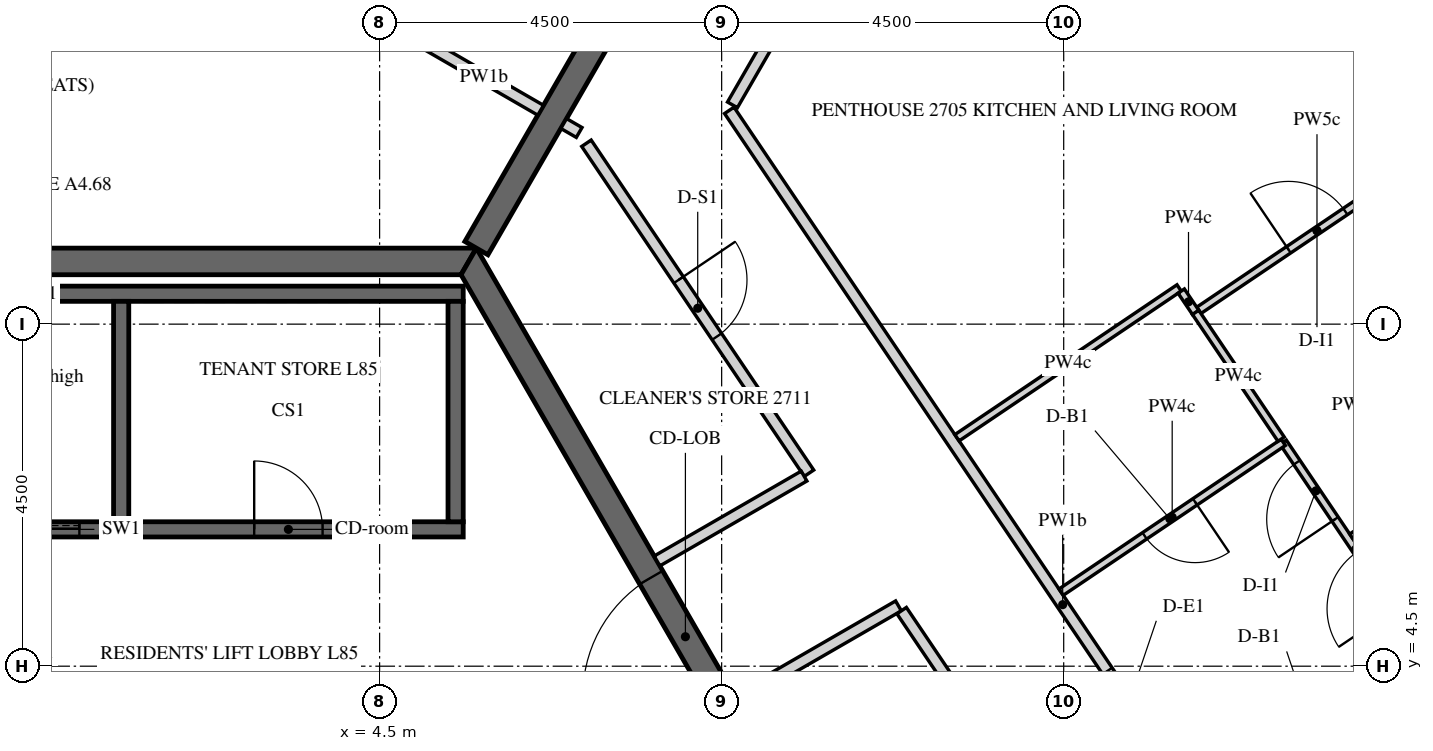
"""IFC4 building model, lengths in metres.
Left out: names, types, materials, properties, quantities, classifications, styles, units other than length and angle.
Written with IfcOpenShell. Run it as: python <this file> out.ifc"""

import sys

from ifc_helpers import new_model, si_unit, direction, frame, frame_2d, origin, place, context, subcontext, project, spatial, polyline, rectangle, outline, extrude, element, fill, save


model = new_model("IFC4")
c1 = context("Model", 3, precision=1e-05, world=origin(), true_north=direction((0.0, 1.0)))
c2 = subcontext(c1, "Body", "Model", "MODEL_VIEW")
j1 = project(units=[si_unit("LENGTHUNIT", "METRE"), si_unit("PLANEANGLEUNIT", "RADIAN")], contexts=[c1])
p1 = place(None, origin())
s1 = spatial("IfcSite", under=j1, at=p1, CompositionType="ELEMENT")
p2 = place(p1, origin())
s2 = spatial("IfcBuilding", under=s1, at=p2, CompositionType="ELEMENT")
p3 = place(p2, frame((0.0, 0.0, 353.4)))
s3 = spatial("IfcBuildingStorey", under=s2, at=p3, CompositionType="ELEMENT", Elevation=353.4)
p4 = place(p3, frame((24.37, 2.811, -0.15), z_axis=(0.0, 0.0, 1.0), x_axis=(-0.559187034749, 0.829041531027, 0.0)))
e1 = element("IfcWall", 1, at=p4, inside=s3, PredefinedType="SOLIDWALL", context=c2, shape_type="SweptSolid", body=[
    extrude(outline(polyline([(0.225, -0.225), (20.506, -0.225), (20.957, 0.225), (-0.225, 0.225), (0.225, -0.225)])), origin(), (0.0, 0.0, 1.0), 3.9),
])
p5 = place(p4, frame((0.325, 0.0, 1.05)))
e2 = element("IfcOpeningElement", 2, at=p5, cuts=e1, PredefinedType="OPENING", context=c2, shape_type="SweptSolid", body=[
    extrude(rectangle(XDim=0.9, YDim=1.5, at=frame_2d((0.45, 0.75))), frame((0.0, 0.235, 0.0), z_axis=(0.0, -1.0, 0.0), x_axis=(1.0, 0.0, 0.0)), (0.0, 0.0, 1.0), 0.47),
])
p6 = place(p4, frame((1.525, 0.0, 0.15)))
e3 = element("IfcOpeningElement", 3, at=p6, cuts=e1, PredefinedType="OPENING", context=c2, shape_type="SweptSolid", body=[
    extrude(rectangle(XDim=1.2, YDim=2.4, at=frame_2d((0.6, 1.2))), frame((0.0, 0.235, 0.0), z_axis=(0.0, -1.0, 0.0), x_axis=(1.0, 0.0, 0.0)), (0.0, 0.0, 1.0), 0.47),
])
p7 = place(p4, frame((3.766, 0.0, 1.05)))
e4 = element("IfcOpeningElement", 4, at=p7, cuts=e1, PredefinedType="OPENING", context=c2, shape_type="SweptSolid", body=[
    extrude(rectangle(XDim=0.9, YDim=1.5, at=frame_2d((0.45, 0.75))), frame((0.0, 0.235, 0.0), z_axis=(0.0, -1.0, 0.0), x_axis=(1.0, 0.0, 0.0)), (0.0, 0.0, 1.0), 0.47),
])
p8 = place(p4, frame((4.966, 0.0, 0.15)))
e5 = element("IfcOpeningElement", 5, at=p8, cuts=e1, PredefinedType="OPENING", context=c2, shape_type="SweptSolid", body=[
    extrude(rectangle(XDim=1.2, YDim=2.4, at=frame_2d((0.6, 1.2))), frame((0.0, 0.235, 0.0), z_axis=(0.0, -1.0, 0.0), x_axis=(1.0, 0.0, 0.0)), (0.0, 0.0, 1.0), 0.47),
])
p9 = place(p4, frame((7.366, 0.0, 1.05)))
e6 = element("IfcOpeningElement", 6, at=p9, cuts=e1, PredefinedType="OPENING", context=c2, shape_type="SweptSolid", body=[
    extrude(rectangle(XDim=0.9, YDim=1.5, at=frame_2d((0.45, 0.75))), frame((0.0, 0.235, 0.0), z_axis=(0.0, -1.0, 0.0), x_axis=(1.0, 0.0, 0.0)), (0.0, 0.0, 1.0), 0.47),
])
p10 = place(p4, frame((8.566, 0.0, 0.15)))
e7 = element("IfcOpeningElement", 7, at=p10, cuts=e1, PredefinedType="OPENING", context=c2, shape_type="SweptSolid", body=[
    extrude(rectangle(XDim=1.2, YDim=2.4, at=frame_2d((0.6, 1.2))), frame((0.0, 0.235, 0.0), z_axis=(0.0, -1.0, 0.0), x_axis=(1.0, 0.0, 0.0)), (0.0, 0.0, 1.0), 0.47),
])
p11 = place(p4, frame((10.966, 0.0, 1.05)))
e8 = element("IfcOpeningElement", 8, at=p11, cuts=e1, PredefinedType="OPENING", context=c2, shape_type="SweptSolid", body=[
    extrude(rectangle(XDim=0.9, YDim=1.5, at=frame_2d((0.45, 0.75))), frame((0.0, 0.235, 0.0), z_axis=(0.0, -1.0, 0.0), x_axis=(1.0, 0.0, 0.0)), (0.0, 0.0, 1.0), 0.47),
])
p12 = place(p4, frame((12.166, 0.0, 0.15)))
e9 = element("IfcOpeningElement", 9, at=p12, cuts=e1, PredefinedType="OPENING", context=c2, shape_type="SweptSolid", body=[
    extrude(rectangle(XDim=1.2, YDim=2.4, at=frame_2d((0.6, 1.2))), frame((0.0, 0.235, 0.0), z_axis=(0.0, -1.0, 0.0), x_axis=(1.0, 0.0, 0.0)), (0.0, 0.0, 1.0), 0.47),
])
p13 = place(p4, frame((14.566, 0.0, 1.05)))
e10 = element("IfcOpeningElement", 10, at=p13, cuts=e1, PredefinedType="OPENING", context=c2, shape_type="SweptSolid", body=[
    extrude(rectangle(XDim=0.9, YDim=1.5, at=frame_2d((0.45, 0.75))), frame((0.0, 0.235, 0.0), z_axis=(0.0, -1.0, 0.0), x_axis=(1.0, 0.0, 0.0)), (0.0, 0.0, 1.0), 0.47),
])
p14 = place(p4, frame((15.766, 0.0, 0.15)))
e11 = element("IfcOpeningElement", 11, at=p14, cuts=e1, PredefinedType="OPENING", context=c2, shape_type="SweptSolid", body=[
    extrude(rectangle(XDim=1.2, YDim=2.4, at=frame_2d((0.6, 1.2))), frame((0.0, 0.235, 0.0), z_axis=(0.0, -1.0, 0.0), x_axis=(1.0, 0.0, 0.0)), (0.0, 0.0, 1.0), 0.47),
])
p15 = place(p4, frame((18.007, 0.0, 1.05)))
e12 = element("IfcOpeningElement", 12, at=p15, cuts=e1, PredefinedType="OPENING", context=c2, shape_type="SweptSolid", body=[
    extrude(rectangle(XDim=0.9, YDim=1.5, at=frame_2d((0.45, 0.75))), frame((0.0, 0.235, 0.0), z_axis=(0.0, -1.0, 0.0), x_axis=(1.0, 0.0, 0.0)), (0.0, 0.0, 1.0), 0.47),
])
p16 = place(p4, frame((19.207, 0.0, 0.15)))
e13 = element("IfcOpeningElement", 13, at=p16, cuts=e1, PredefinedType="OPENING", context=c2, shape_type="SweptSolid", body=[
    extrude(rectangle(XDim=1.2, YDim=2.4, at=frame_2d((0.6, 1.2))), frame((0.0, 0.235, 0.0), z_axis=(0.0, -1.0, 0.0), x_axis=(1.0, 0.0, 0.0)), (0.0, 0.0, 1.0), 0.47),
])
p17 = place(p3, frame((11.345, 0.0, -0.15), z_axis=(0.0, 0.0, 1.0), x_axis=(-0.499995046907, 0.866028263435, 0.0)))
e14 = element("IfcWall", 14, at=p17, inside=s3, PredefinedType="SHEAR", context=c2, shape_type="SweptSolid", body=[
    extrude(outline(polyline([(-0.101, -0.175), (11.446, -0.175), (11.244, 0.175), (0.101, 0.175), (-0.101, -0.175)])), origin(), (0.0, 0.0, 1.0), 3.9),
])
p18 = place(p17, frame((4.744, 0.0, 0.15)))
e15 = element("IfcOpeningElement", 15, at=p18, cuts=e14, PredefinedType="OPENING", context=c2, shape_type="SweptSolid", body=[
    extrude(rectangle(XDim=1.8, YDim=2.4, at=frame_2d((0.9, 1.2))), frame((0.0, 0.185, 0.0), z_axis=(0.0, -1.0, 0.0), x_axis=(1.0, 0.0, 0.0)), (0.0, 0.0, 1.0), 0.37),
])
p19 = place(p3, frame((5.673, 9.825, -0.15), z_axis=(0.0, 0.0, 1.0), x_axis=(-1.0, 0.0, 0.0)))
e16 = element("IfcWall", 16, at=p19, inside=s3, PredefinedType="SHEAR", context=c2, shape_type="SweptSolid", body=[
    extrude(outline(polyline([(-0.101, -0.175), (11.446, -0.175), (11.244, 0.175), (0.101, 0.175), (-0.101, -0.175)])), origin(), (0.0, 0.0, 1.0), 3.9),
])
p20 = place(p3, frame((5.773, 10.0, -0.15), z_axis=(0.0, 0.0, 1.0), x_axis=(0.500007911273, 0.866020836161, 0.0)))
e17 = element("IfcWall", 17, at=p20, inside=s3, PredefinedType="SHEAR", context=c2, shape_type="SweptSolid", body=[
    extrude(rectangle(XDim=14.51, YDim=0.35, at=frame_2d((7.255, 0.0))), origin(), (0.0, 0.0, 1.0), 3.9),
])
p21 = place(p20, frame((6.355, 0.0, 0.15)))
e18 = element("IfcOpeningElement", 18, at=p21, cuts=e17, PredefinedType="OPENING", context=c2, shape_type="SweptSolid", body=[
    extrude(rectangle(XDim=1.8, YDim=2.4, at=frame_2d((0.9, 1.2))), frame((0.0, 0.185, 0.0), z_axis=(0.0, -1.0, 0.0), x_axis=(1.0, 0.0, 0.0)), (0.0, 0.0, 1.0), 0.37),
])
p22 = place(p3, frame((-5.6, 6.3, -0.25), z_axis=(0.0, 0.0, 1.0), x_axis=(1.0, 0.0, 0.0)))
e19 = element("IfcWall", 19, at=p22, inside=s3, PredefinedType="SHEAR", context=c2, shape_type="SweptSolid", body=[
    extrude(rectangle(XDim=11.2, YDim=0.2, at=frame_2d((5.6, 0.0))), origin(), (0.0, 0.0, 1.0), 3.9),
])
p23 = place(p22, frame((8.45, 0.0, 0.25)))
e20 = element("IfcOpeningElement", 20, at=p23, cuts=e19, PredefinedType="OPENING", context=c2, shape_type="SweptSolid", body=[
    extrude(rectangle(XDim=0.9, YDim=2.1, at=frame_2d((0.45, 1.05))), frame((0.0, 0.11, 0.0), z_axis=(0.0, -1.0, 0.0), x_axis=(1.0, 0.0, 0.0)), (0.0, 0.0, 1.0), 0.22),
])
p24 = place(p22, frame((0.65, 0.0, 0.25)))
e21 = element("IfcOpeningElement", 21, at=p24, cuts=e19, PredefinedType="OPENING", context=c2, shape_type="SweptSolid", body=[
    extrude(rectangle(XDim=1.1, YDim=2.1, at=frame_2d((0.55, 1.05))), frame((0.0, 0.11, 0.0), z_axis=(0.0, -1.0, 0.0), x_axis=(1.0, 0.0, 0.0)), (0.0, 0.0, 1.0), 0.22),
])
p25 = place(p22, frame((2.85, 0.0, 0.25)))
e22 = element("IfcOpeningElement", 22, at=p25, cuts=e19, PredefinedType="OPENING", context=c2, shape_type="SweptSolid", body=[
    extrude(rectangle(XDim=1.1, YDim=2.1, at=frame_2d((0.55, 1.05))), frame((0.0, 0.11, 0.0), z_axis=(0.0, -1.0, 0.0), x_axis=(1.0, 0.0, 0.0)), (0.0, 0.0, 1.0), 0.22),
])
p26 = place(p22, frame((5.05, 0.0, 0.25)))
e23 = element("IfcOpeningElement", 23, at=p26, cuts=e19, PredefinedType="OPENING", context=c2, shape_type="SweptSolid", body=[
    extrude(rectangle(XDim=1.1, YDim=2.1, at=frame_2d((0.55, 1.05))), frame((0.0, 0.11, 0.0), z_axis=(0.0, -1.0, 0.0), x_axis=(1.0, 0.0, 0.0)), (0.0, 0.0, 1.0), 0.22),
])
p27 = place(p3, frame((-5.6, 9.4, -0.25), z_axis=(0.0, 0.0, 1.0), x_axis=(1.0, 0.0, 0.0)))
e24 = element("IfcWall", 24, at=p27, inside=s3, PredefinedType="SHEAR", context=c2, shape_type="SweptSolid", body=[
    extrude(rectangle(XDim=11.2, YDim=0.2, at=frame_2d((5.6, 0.0))), origin(), (0.0, 0.0, 1.0), 3.9),
])
for number, where, z_axis, x_axis in (
    (25, (1.1, 6.4, -0.25), (0.0, 0.0, 1.0), (0.0, 1.0, 0.0)),
    (26, (5.5, 6.4, -0.25), (0.0, 0.0, 1.0), (0.0, 1.0, 0.0)),
):
    element("IfcWall", number, at=place(p3, frame(where, z_axis=z_axis, x_axis=x_axis)), inside=s3, PredefinedType="SHEAR", context=c2, shape_type="SweptSolid", body=[
        extrude(rectangle(XDim=2.9, YDim=0.2, at=frame_2d((1.45, 0.0))), origin(), (0.0, 0.0, 1.0), 3.9),
    ])
p28 = place(p3, frame((5.125, 12.677, 0.0), z_axis=(0.0, 0.0, 1.0), x_axis=(0.866013532718, -0.500020560727, 0.0)))
e27 = element("IfcWall", 27, at=p28, inside=s3, PredefinedType="PARTITIONING", context=c2, shape_type="SweptSolid", body=[
    extrude(rectangle(XDim=1.725, YDim=0.15, at=frame_2d((0.863, 0.0))), origin(), (0.0, 0.0, 1.0), 2.82),
])
p29 = place(p3, frame((17.873, -1.193, 0.0), z_axis=(0.0, 0.0, 1.0), x_axis=(-0.559195650252, 0.829035719821, 0.0)))
e28 = element("IfcWall", 28, at=p29, inside=s3, PredefinedType="PARTITIONING", context=c2, shape_type="SweptSolid", body=[
    extrude(rectangle(XDim=15.688, YDim=0.15, at=frame_2d((7.844, 0.0))), origin(), (0.0, 0.0, 1.0), 2.82),
])
p30 = place(p29, frame((5.792, 0.0, 0.0)))
e29 = element("IfcOpeningElement", 29, at=p30, cuts=e28, PredefinedType="OPENING", context=c2, shape_type="SweptSolid", body=[
    extrude(rectangle(XDim=1.0, YDim=2.1, at=frame_2d((0.5, 1.05))), frame((0.0, 0.085, 0.0), z_axis=(0.0, -1.0, 0.0), x_axis=(1.0, 0.0, 0.0)), (0.0, 0.0, 1.0), 0.17),
])
p31 = place(p3, frame((9.142, 11.885, 0.0), z_axis=(0.0, 0.0, 1.0), x_axis=(0.500004822225, 0.866022619654, 0.0)))
e30 = element("IfcWall", 30, at=p31, inside=s3, PredefinedType="PARTITIONING", context=c2, shape_type="SweptSolid", body=[
    extrude(rectangle(XDim=5.339, YDim=0.15, at=frame_2d((2.669, 0.0))), origin(), (0.0, 0.0, 1.0), 2.82),
])
p32 = place(p3, frame((9.2, 4.066, 0.0), z_axis=(0.0, 0.0, 1.0), x_axis=(0.866038240688, 0.499977765172, 0.0)))
e31 = element("IfcWall", 31, at=p32, inside=s3, PredefinedType="PARTITIONING", context=c2, shape_type="SweptSolid", body=[
    extrude(rectangle(XDim=2.456, YDim=0.15, at=frame_2d((1.228, 0.0))), origin(), (0.0, 0.0, 1.0), 2.82),
])
p33 = place(p3, frame((11.368, 5.231, 0.0), z_axis=(0.0, 0.0, 1.0), x_axis=(0.55919388604, -0.829036909803, 0.0)))
e32 = element("IfcWall", 32, at=p33, inside=s3, PredefinedType="PARTITIONING", context=c2, shape_type="SweptSolid", body=[
    extrude(rectangle(XDim=7.922, YDim=0.15, at=frame_2d((3.961, 0.0))), origin(), (0.0, 0.0, 1.0), 2.82),
])
p34 = place(p33, frame((3.511, 0.0, 0.0)))
e33 = element("IfcOpeningElement", 33, at=p34, cuts=e32, PredefinedType="OPENING", context=c2, shape_type="SweptSolid", body=[
    extrude(rectangle(XDim=0.9, YDim=2.1, at=frame_2d((0.45, 1.05))), frame((0.0, 0.085, 0.0), z_axis=(0.0, -1.0, 0.0), x_axis=(1.0, 0.0, 0.0)), (0.0, 0.0, 1.0), 0.17),
])
p35 = place(p3, frame((6.922, 11.639, 0.0), z_axis=(0.0, 0.0, 1.0), x_axis=(0.866254745882, -0.499602557277, 0.0)))
e34 = element("IfcWall", 34, at=p35, inside=s3, PredefinedType="PARTITIONING", context=c2, shape_type="SweptSolid", body=[
    extrude(rectangle(XDim=0.235, YDim=0.15, at=frame_2d((0.118, 0.0))), origin(), (0.0, 0.0, 1.0), 2.82),
])
p36 = place(p3, frame((7.221, 11.38, 0.0), z_axis=(0.0, 0.0, 1.0), x_axis=(0.559200548931, -0.829032415576, 0.0)))
e35 = element("IfcWall", 35, at=p36, inside=s3, PredefinedType="PARTITIONING", context=c2, shape_type="SweptSolid", body=[
    extrude(rectangle(XDim=5.236, YDim=0.15, at=frame_2d((2.618, 0.0))), origin(), (0.0, 0.0, 1.0), 2.82),
])
p37 = place(p36, frame((2.168, 0.0, 0.0)))
e36 = element("IfcOpeningElement", 36, at=p37, cuts=e35, PredefinedType="OPENING", context=c2, shape_type="SweptSolid", body=[
    extrude(rectangle(XDim=0.9, YDim=2.1, at=frame_2d((0.45, 1.05))), frame((0.0, 0.085, 0.0), z_axis=(0.0, -1.0, 0.0), x_axis=(1.0, 0.0, 0.0)), (0.0, 0.0, 1.0), 0.17),
])
p38 = place(p3, frame((10.084, 7.001, 0.0), z_axis=(0.0, 0.0, 1.0), x_axis=(-0.865994457699, -0.500053596362, 0.0)))
e37 = element("IfcWall", 37, at=p38, inside=s3, PredefinedType="PARTITIONING", context=c2, shape_type="SweptSolid", body=[
    extrude(rectangle(XDim=2.234, YDim=0.15, at=frame_2d((1.117, 0.0))), origin(), (0.0, 0.0, 1.0), 2.82),
])
p39 = place(p3, frame((15.278, 9.181, 0.0), z_axis=(0.0, 0.0, 1.0), x_axis=(0.829043350963, 0.559184336534, 0.0)))
e38 = element("IfcWall", 38, at=p39, inside=s3, PredefinedType="PARTITIONING", context=c2, shape_type="SweptSolid", body=[
    extrude(rectangle(XDim=3.75, YDim=0.1, at=frame_2d((1.875, 0.0))), origin(), (0.0, 0.0, 1.0), 2.82),
])
p40 = place(p39, frame((1.425, 0.0, 0.0)))
e39 = element("IfcOpeningElement", 39, at=p40, cuts=e38, PredefinedType="OPENING", context=c2, shape_type="SweptSolid", body=[
    extrude(rectangle(XDim=0.9, YDim=2.1, at=frame_2d((0.45, 1.05))), frame((0.0, 0.06, 0.0), z_axis=(0.0, -1.0, 0.0), x_axis=(1.0, 0.0, 0.0)), (0.0, 0.0, 1.0), 0.12),
])
p41 = place(p3, frame((12.096, 7.505, 0.0), z_axis=(0.0, 0.0, 1.0), x_axis=(0.829065408555, 0.559151632687, 0.0)))
e40 = element("IfcWall", 40, at=p41, inside=s3, PredefinedType="PARTITIONING", context=c2, shape_type="SweptSolid", body=[
    extrude(rectangle(XDim=3.525, YDim=0.1, at=frame_2d((1.762, 0.0))), origin(), (0.0, 0.0, 1.0), 2.82),
])
p42 = place(p3, frame((15.046, 9.435, 0.0), z_axis=(0.0, 0.0, 1.0), x_axis=(0.559141668278, -0.829072128826, 0.0)))
e41 = element("IfcWall", 41, at=p42, inside=s3, PredefinedType="PARTITIONING", context=c2, shape_type="SweptSolid", body=[
    extrude(rectangle(XDim=0.342, YDim=0.1, at=frame_2d((0.171, 0.0))), origin(), (0.0, 0.0, 1.0), 2.82),
])
p43 = place(p3, frame((15.367, 2.655, 0.0), z_axis=(0.0, 0.0, 1.0), x_axis=(0.829033300448, 0.559199237078, 0.0)))
e42 = element("IfcWall", 42, at=p43, inside=s3, PredefinedType="PARTITIONING", context=c2, shape_type="SweptSolid", body=[
    extrude(rectangle(XDim=3.525, YDim=0.1, at=frame_2d((1.763, 0.0))), origin(), (0.0, 0.0, 1.0), 2.82),
])
p44 = place(p43, frame((1.325, 0.0, 0.0)))
e43 = element("IfcOpeningElement", 43, at=p44, cuts=e42, PredefinedType="OPENING", context=c2, shape_type="SweptSolid", body=[
    extrude(rectangle(XDim=0.8, YDim=2.1, at=frame_2d((0.4, 1.05))), frame((0.0, 0.06, 0.0), z_axis=(0.0, -1.0, 0.0), x_axis=(1.0, 0.0, 0.0)), (0.0, 0.0, 1.0), 0.12),
])
p45 = place(p3, frame((18.291, 4.625, 0.0), z_axis=(0.0, 0.0, 1.0), x_axis=(-0.55916115895, 0.82905898362, 0.0)))
e44 = element("IfcWall", 44, at=p45, inside=s3, PredefinedType="PARTITIONING", context=c2, shape_type="SweptSolid", body=[
    extrude(rectangle(XDim=3.404, YDim=0.1, at=frame_2d((1.702, 0.0))), origin(), (0.0, 0.0, 1.0), 2.82),
])
p46 = place(p45, frame((0.762, 0.0, 0.0)))
e45 = element("IfcOpeningElement", 45, at=p46, cuts=e44, PredefinedType="OPENING", context=c2, shape_type="SweptSolid", body=[
    extrude(rectangle(XDim=0.9, YDim=2.1, at=frame_2d((0.45, 1.05))), frame((0.0, 0.06, 0.0), z_axis=(0.0, -1.0, 0.0), x_axis=(1.0, 0.0, 0.0)), (0.0, 0.0, 1.0), 0.12),
])
p47 = place(p45, frame((2.182, 0.0, 0.0)))
e46 = element("IfcOpeningElement", 46, at=p47, cuts=e44, PredefinedType="OPENING", context=c2, shape_type="SweptSolid", body=[
    extrude(rectangle(XDim=0.9, YDim=2.1, at=frame_2d((0.45, 1.05))), frame((0.0, 0.06, 0.0), z_axis=(0.0, -1.0, 0.0), x_axis=(1.0, 0.0, 0.0)), (0.0, 0.0, 1.0), 0.12),
])
p48 = place(p3, frame((16.388, 7.445, 0.0), z_axis=(0.0, 0.0, 1.0), x_axis=(-0.829033300448, -0.559199237078, 0.0)))
e47 = element("IfcWall", 47, at=p48, inside=s3, PredefinedType="PARTITIONING", context=c2, shape_type="SweptSolid", body=[
    extrude(rectangle(XDim=3.525, YDim=0.1, at=frame_2d((1.763, 0.0))), origin(), (0.0, 0.0, 1.0), 2.82),
])
p49 = place(p48, frame((1.4, 0.0, 0.0)))
e48 = element("IfcOpeningElement", 48, at=p49, cuts=e47, PredefinedType="OPENING", context=c2, shape_type="SweptSolid", body=[
    extrude(rectangle(XDim=0.8, YDim=2.1, at=frame_2d((0.4, 1.05))), frame((0.0, 0.06, 0.0), z_axis=(0.0, -1.0, 0.0), x_axis=(1.0, 0.0, 0.0)), (0.0, 0.0, 1.0), 0.12),
])
p50 = place(p3, frame((20.4, 8.294, 0.0), z_axis=(0.0, 0.0, 1.0), x_axis=(-0.829043350963, -0.559184336534, 0.0)))
e49 = element("IfcWall", 49, at=p50, inside=s3, PredefinedType="PARTITIONING", context=c2, shape_type="SweptSolid", body=[
    extrude(rectangle(XDim=3.75, YDim=0.1, at=frame_2d((1.875, 0.0))), origin(), (0.0, 0.0, 1.0), 2.82),
])
p51 = place(p3, frame((15.235, 9.155, 0.0), z_axis=(0.0, 0.0, 1.0), x_axis=(0.559199850123, -0.829032886937, 0.0)))
e50 = element("IfcWall", 50, at=p51, inside=s3, PredefinedType="PARTITIONING", context=c2, shape_type="SweptSolid", body=[
    extrude(rectangle(XDim=2.012, YDim=0.1, at=frame_2d((1.006, 0.0))), origin(), (0.0, 0.0, 1.0), 2.82),
])
p52 = place(p18, origin())
e51 = element("IfcDoor", 51, at=p52, inside=s3, OperationType="DOUBLE_DOOR_SINGLE_SWING", PredefinedType="DOOR", context=c2, shape_type="SweptSolid", body=[
    extrude(rectangle(XDim=1.8, YDim=2.4, at=frame_2d((0.9, 1.2))), frame((0.0, 0.025, 0.0), z_axis=(0.0, -1.0, 0.0), x_axis=(1.0, 0.0, 0.0)), (0.0, 0.0, 1.0), 0.05),
])
fill(e15, e51)
p53 = place(p23, origin())
e52 = element("IfcDoor", 52, at=p53, inside=s3, OperationType="SINGLE_SWING_LEFT", PredefinedType="DOOR", context=c2, shape_type="SweptSolid", body=[
    extrude(rectangle(XDim=0.9, YDim=2.1, at=frame_2d((0.45, 1.05))), frame((0.0, 0.025, 0.0), z_axis=(0.0, -1.0, 0.0), x_axis=(1.0, 0.0, 0.0)), (0.0, 0.0, 1.0), 0.05),
])
fill(e20, e52)
p54 = place(p26, origin())
e53 = element("IfcDoor", 53, at=p54, inside=s3, OperationType="SLIDING_TO_LEFT", PredefinedType="DOOR", context=c2, shape_type="SweptSolid", body=[
    extrude(rectangle(XDim=1.1, YDim=2.1, at=frame_2d((0.55, 1.05))), frame((0.0, 0.025, 0.0), z_axis=(0.0, -1.0, 0.0), x_axis=(1.0, 0.0, 0.0)), (0.0, 0.0, 1.0), 0.05),
])
fill(e23, e53)
p55 = place(p30, origin())
e54 = element("IfcDoor", 54, at=p55, inside=s3, OperationType="SINGLE_SWING_LEFT", PredefinedType="DOOR", context=c2, shape_type="SweptSolid", body=[
    extrude(rectangle(XDim=1.0, YDim=2.1, at=frame_2d((0.5, 1.05))), frame((0.0, 0.025, 0.0), z_axis=(0.0, -1.0, 0.0), x_axis=(1.0, 0.0, 0.0)), (0.0, 0.0, 1.0), 0.05),
])
fill(e29, e54)
p56 = place(p47, origin())
e55 = element("IfcDoor", 55, at=p56, inside=s3, OperationType="SINGLE_SWING_LEFT", PredefinedType="DOOR", context=c2, shape_type="SweptSolid", body=[
    extrude(rectangle(XDim=0.9, YDim=2.1, at=frame_2d((0.45, 1.05))), frame((0.0, 0.025, 0.0), z_axis=(0.0, -1.0, 0.0), x_axis=(1.0, 0.0, 0.0)), (0.0, 0.0, 1.0), 0.05),
])
fill(e46, e55)
p57 = place(p49, origin())
e56 = element("IfcDoor", 56, at=p57, inside=s3, OperationType="SINGLE_SWING_LEFT", PredefinedType="DOOR", context=c2, shape_type="SweptSolid", body=[
    extrude(rectangle(XDim=0.8, YDim=2.1, at=frame_2d((0.4, 1.05))), frame((0.0, 0.025, 0.0), z_axis=(0.0, -1.0, 0.0), x_axis=(1.0, 0.0, 0.0)), (0.0, 0.0, 1.0), 0.05),
])
fill(e48, e56)
p58 = place(p40, origin())
e57 = element("IfcDoor", 57, at=p58, inside=s3, OperationType="SINGLE_SWING_RIGHT", PredefinedType="DOOR", context=c2, shape_type="SweptSolid", body=[
    extrude(rectangle(XDim=0.9, YDim=2.1, at=frame_2d((0.45, 1.05))), frame((0.0, 0.025, 0.0), z_axis=(0.0, -1.0, 0.0), x_axis=(1.0, 0.0, 0.0)), (0.0, 0.0, 1.0), 0.05),
])
fill(e39, e57)
p59 = place(p37, origin())
e58 = element("IfcDoor", 58, at=p59, inside=s3, OperationType="SINGLE_SWING_RIGHT", PredefinedType="DOOR", context=c2, shape_type="SweptSolid", body=[
    extrude(rectangle(XDim=0.9, YDim=2.1, at=frame_2d((0.45, 1.05))), frame((0.0, 0.025, 0.0), z_axis=(0.0, -1.0, 0.0), x_axis=(1.0, 0.0, 0.0)), (0.0, 0.0, 1.0), 0.05),
])
fill(e36, e58)
save(model, sys.argv[1])
